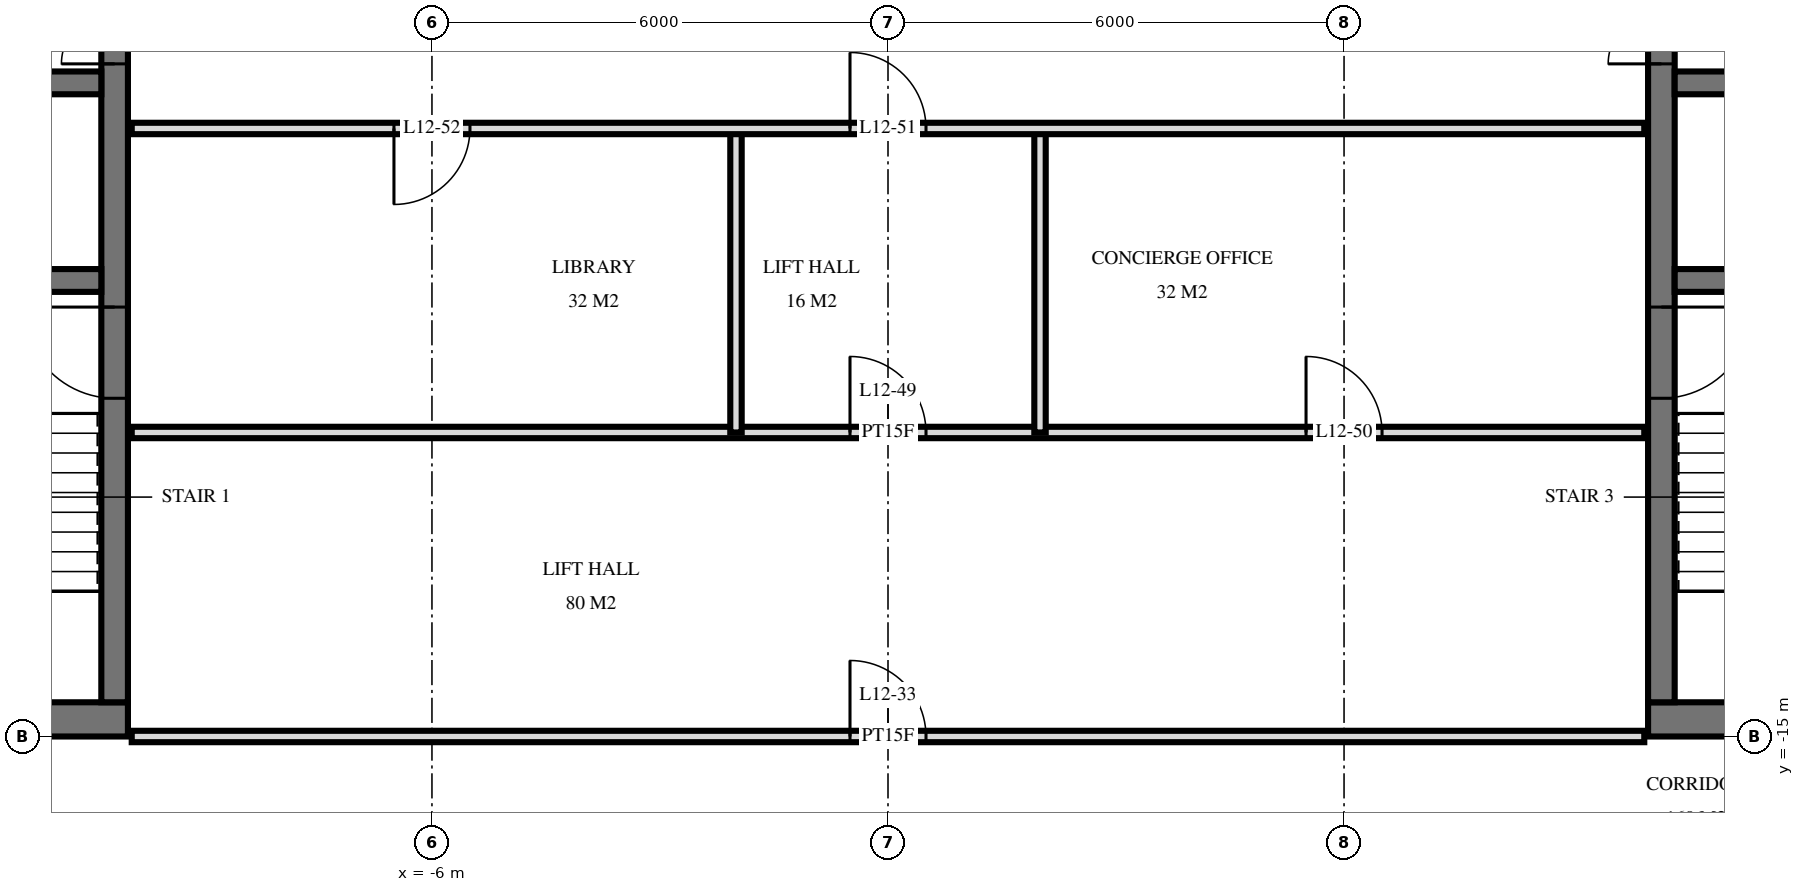
"""IFC4 building model, lengths in metres.
Left out: names, types, materials, properties, quantities, classifications, styles, units other than length and angle.
Written with IfcOpenShell. Run it as: python <this file> out.ifc"""

import sys

from ifc_helpers import new_model, si_unit, direction, frame, frame_2d, origin, place, context, subcontext, project, spatial, rectangle, extrude, element, fill, save


model = new_model("IFC4")
c1 = context("Model", 3, precision=1e-05, world=origin(), true_north=direction((0.0, 1.0)))
c2 = subcontext(c1, "Body", "Model", "MODEL_VIEW")
j1 = project(units=[si_unit("LENGTHUNIT", "METRE"), si_unit("PLANEANGLEUNIT", "RADIAN")], contexts=[c1])
p1 = place(None, origin())
s1 = spatial("IfcSite", under=j1, at=p1, CompositionType="ELEMENT")
p2 = place(p1, origin())
s2 = spatial("IfcBuilding", under=s1, at=p2, CompositionType="ELEMENT")
p3 = place(p2, frame((0.0, 0.0, 52.8)))
s3 = spatial("IfcBuildingStorey", under=s2, at=p3, CompositionType="ELEMENT", Elevation=52.8)
p4 = place(p3, frame((-29.5, -14.775, 0.0), z_axis=(0.0, 0.0, 1.0), x_axis=(1.0, 0.0, 0.0)))
e1 = element("IfcWall", 1, at=p4, inside=s3, PredefinedType="SHEAR", context=c2, shape_type="SweptSolid", body=[
    extrude(rectangle(XDim=19.5, YDim=0.45, at=frame_2d((9.75, 0.0))), origin(), (0.0, 0.0, 1.0), 3.6),
])
p5 = place(p4, frame((11.2, 0.0, 0.0)))
e2 = element("IfcOpeningElement", 2, at=p5, cuts=e1, PredefinedType="OPENING", context=c2, shape_type="SweptSolid", body=[
    extrude(rectangle(XDim=1.2, YDim=2.1, at=frame_2d((0.6, 1.05))), frame((0.0, 0.235, 0.0), z_axis=(0.0, -1.0, 0.0), x_axis=(1.0, 0.0, 0.0)), (0.0, 0.0, 1.0), 0.47),
])
p6 = place(p4, frame((14.25, 0.0, 0.0)))
e3 = element("IfcOpeningElement", 3, at=p6, cuts=e1, PredefinedType="OPENING", context=c2, shape_type="SweptSolid", body=[
    extrude(rectangle(XDim=1.1, YDim=2.1, at=frame_2d((0.55, 1.05))), frame((0.0, 0.235, 0.0), z_axis=(0.0, -1.0, 0.0), x_axis=(1.0, 0.0, 0.0)), (0.0, 0.0, 1.0), 0.47),
])
p7 = place(p4, frame((8.5, 0.0, 0.0)))
e4 = element("IfcOpeningElement", 4, at=p7, cuts=e1, PredefinedType="OPENING", context=c2, shape_type="SweptSolid", body=[
    extrude(rectangle(XDim=0.9, YDim=2.1, at=frame_2d((0.45, 1.05))), frame((0.0, 0.235, 0.0), z_axis=(0.0, -1.0, 0.0), x_axis=(1.0, 0.0, 0.0)), (0.0, 0.0, 1.0), 0.47),
])
p8 = place(p4, frame((6.05, 0.0, 0.0)))
e5 = element("IfcOpeningElement", 5, at=p8, cuts=e1, PredefinedType="OPENING", context=c2, shape_type="SweptSolid", body=[
    extrude(rectangle(XDim=1.0, YDim=2.1, at=frame_2d((0.5, 1.05))), frame((0.0, 0.235, 0.0), z_axis=(0.0, -1.0, 0.0), x_axis=(1.0, 0.0, 0.0)), (0.0, 0.0, 1.0), 0.47),
])
p9 = place(p4, frame((3.413, 0.0, 0.0)))
e6 = element("IfcOpeningElement", 6, at=p9, cuts=e1, PredefinedType="OPENING", context=c2, shape_type="SweptSolid", body=[
    extrude(rectangle(XDim=1.0, YDim=2.1, at=frame_2d((0.5, 1.05))), frame((0.0, 0.235, 0.0), z_axis=(0.0, -1.0, 0.0), x_axis=(1.0, 0.0, 0.0)), (0.0, 0.0, 1.0), 0.47),
])
p10 = place(p4, frame((1.087, 0.0, 0.0)))
e7 = element("IfcOpeningElement", 7, at=p10, cuts=e1, PredefinedType="OPENING", context=c2, shape_type="SweptSolid", body=[
    extrude(rectangle(XDim=1.0, YDim=2.1, at=frame_2d((0.5, 1.05))), frame((0.0, 0.235, 0.0), z_axis=(0.0, -1.0, 0.0), x_axis=(1.0, 0.0, 0.0)), (0.0, 0.0, 1.0), 0.47),
])
p11 = place(p3, frame((-10.175, -14.55, 0.0), z_axis=(0.0, 0.0, 1.0), x_axis=(0.0, 1.0, 0.0)))
e8 = element("IfcWall", 8, at=p11, inside=s3, PredefinedType="SHEAR", context=c2, shape_type="SweptSolid", body=[
    extrude(rectangle(XDim=14.1, YDim=0.35, at=frame_2d((7.05, 0.0))), origin(), (0.0, 0.0, 1.0), 3.6),
])
p12 = place(p11, frame((8.4, 0.0, 0.0)))
e9 = element("IfcOpeningElement", 9, at=p12, cuts=e8, PredefinedType="OPENING", context=c2, shape_type="SweptSolid", body=[
    extrude(rectangle(XDim=1.4, YDim=2.4, at=frame_2d((0.7, 1.2))), frame((0.0, 0.185, 0.0), z_axis=(0.0, -1.0, 0.0), x_axis=(1.0, 0.0, 0.0)), (0.0, 0.0, 1.0), 0.37),
])
p13 = place(p11, frame((10.0, 0.0, 0.0)))
e10 = element("IfcOpeningElement", 10, at=p13, cuts=e8, PredefinedType="OPENING", context=c2, shape_type="SweptSolid", body=[
    extrude(rectangle(XDim=1.4, YDim=2.4, at=frame_2d((0.7, 1.2))), frame((0.0, 0.185, 0.0), z_axis=(0.0, -1.0, 0.0), x_axis=(1.0, 0.0, 0.0)), (0.0, 0.0, 1.0), 0.37),
])
p14 = place(p11, frame((4.0, 0.0, 0.0)))
e11 = element("IfcOpeningElement", 11, at=p14, cuts=e8, PredefinedType="OPENING", context=c2, shape_type="SweptSolid", body=[
    extrude(rectangle(XDim=1.2, YDim=2.1, at=frame_2d((0.6, 1.05))), frame((0.0, 0.185, 0.0), z_axis=(0.0, -1.0, 0.0), x_axis=(1.0, 0.0, 0.0)), (0.0, 0.0, 1.0), 0.37),
])
p15 = place(p3, frame((-29.05, -6.4, 0.0), z_axis=(0.0, 0.0, 1.0), x_axis=(1.0, 0.0, 0.0)))
e12 = element("IfcWall", 12, at=p15, inside=s3, PredefinedType="SHEAR", context=c2, shape_type="SweptSolid", body=[
    extrude(rectangle(XDim=18.7, YDim=0.3, at=frame_2d((9.35, 0.0))), origin(), (0.0, 0.0, 1.0), 3.6),
])
p16 = place(p15, frame((2.95, 0.0, 0.0)))
e13 = element("IfcOpeningElement", 13, at=p16, cuts=e12, PredefinedType="OPENING", context=c2, shape_type="SweptSolid", body=[
    extrude(rectangle(XDim=1.1, YDim=2.1, at=frame_2d((0.55, 1.05))), frame((0.0, 0.16, 0.0), z_axis=(0.0, -1.0, 0.0), x_axis=(1.0, 0.0, 0.0)), (0.0, 0.0, 1.0), 0.32),
])
p17 = place(p15, frame((0.55, 0.0, 0.0)))
e14 = element("IfcOpeningElement", 14, at=p17, cuts=e12, PredefinedType="OPENING", context=c2, shape_type="SweptSolid", body=[
    extrude(rectangle(XDim=1.1, YDim=2.1, at=frame_2d((0.55, 1.05))), frame((0.0, 0.16, 0.0), z_axis=(0.0, -1.0, 0.0), x_axis=(1.0, 0.0, 0.0)), (0.0, 0.0, 1.0), 0.32),
])
p18 = place(p15, frame((10.8, 0.0, 0.0)))
e15 = element("IfcOpeningElement", 15, at=p18, cuts=e12, PredefinedType="OPENING", context=c2, shape_type="SweptSolid", body=[
    extrude(rectangle(XDim=1.1, YDim=2.1, at=frame_2d((0.55, 1.05))), frame((0.0, 0.16, 0.0), z_axis=(0.0, -1.0, 0.0), x_axis=(1.0, 0.0, 0.0)), (0.0, 0.0, 1.0), 0.32),
])
p19 = place(p15, frame((5.6, 0.0, 0.0)))
e16 = element("IfcOpeningElement", 16, at=p19, cuts=e12, PredefinedType="OPENING", context=c2, shape_type="SweptSolid", body=[
    extrude(rectangle(XDim=1.0, YDim=2.1, at=frame_2d((0.5, 1.05))), frame((0.0, 0.16, 0.0), z_axis=(0.0, -1.0, 0.0), x_axis=(1.0, 0.0, 0.0)), (0.0, 0.0, 1.0), 0.32),
])
p20 = place(p3, frame((-29.05, -9.0, 0.0), z_axis=(0.0, 0.0, 1.0), x_axis=(1.0, 0.0, 0.0)))
e17 = element("IfcWall", 17, at=p20, inside=s3, PredefinedType="SHEAR", context=c2, shape_type="SweptSolid", body=[
    extrude(rectangle(XDim=18.7, YDim=0.3, at=frame_2d((9.35, 0.0))), origin(), (0.0, 0.0, 1.0), 3.6),
])
p21 = place(p20, frame((13.8, 0.0, 0.0)))
e18 = element("IfcOpeningElement", 18, at=p21, cuts=e17, PredefinedType="OPENING", context=c2, shape_type="SweptSolid", body=[
    extrude(rectangle(XDim=1.1, YDim=2.1, at=frame_2d((0.55, 1.05))), frame((0.0, 0.16, 0.0), z_axis=(0.0, -1.0, 0.0), x_axis=(1.0, 0.0, 0.0)), (0.0, 0.0, 1.0), 0.32),
])
p22 = place(p3, frame((10.0, -14.775, 0.0), z_axis=(0.0, 0.0, 1.0), x_axis=(1.0, 0.0, 0.0)))
e19 = element("IfcWall", 19, at=p22, inside=s3, PredefinedType="SHEAR", context=c2, shape_type="SweptSolid", body=[
    extrude(rectangle(XDim=19.5, YDim=0.45, at=frame_2d((9.75, 0.0))), origin(), (0.0, 0.0, 1.0), 3.6),
])
p23 = place(p22, frame((7.1, 0.0, 0.0)))
e20 = element("IfcOpeningElement", 20, at=p23, cuts=e19, PredefinedType="OPENING", context=c2, shape_type="SweptSolid", body=[
    extrude(rectangle(XDim=1.2, YDim=2.1, at=frame_2d((0.6, 1.05))), frame((0.0, 0.235, 0.0), z_axis=(0.0, -1.0, 0.0), x_axis=(1.0, 0.0, 0.0)), (0.0, 0.0, 1.0), 0.47),
])
p24 = place(p22, frame((4.15, 0.0, 0.0)))
e21 = element("IfcOpeningElement", 21, at=p24, cuts=e19, PredefinedType="OPENING", context=c2, shape_type="SweptSolid", body=[
    extrude(rectangle(XDim=1.1, YDim=2.1, at=frame_2d((0.55, 1.05))), frame((0.0, 0.235, 0.0), z_axis=(0.0, -1.0, 0.0), x_axis=(1.0, 0.0, 0.0)), (0.0, 0.0, 1.0), 0.47),
])
p25 = place(p22, frame((10.1, 0.0, 0.0)))
e22 = element("IfcOpeningElement", 22, at=p25, cuts=e19, PredefinedType="OPENING", context=c2, shape_type="SweptSolid", body=[
    extrude(rectangle(XDim=0.9, YDim=2.1, at=frame_2d((0.45, 1.05))), frame((0.0, 0.235, 0.0), z_axis=(0.0, -1.0, 0.0), x_axis=(1.0, 0.0, 0.0)), (0.0, 0.0, 1.0), 0.47),
])
p26 = place(p22, frame((12.45, 0.0, 0.0)))
e23 = element("IfcOpeningElement", 23, at=p26, cuts=e19, PredefinedType="OPENING", context=c2, shape_type="SweptSolid", body=[
    extrude(rectangle(XDim=1.0, YDim=2.1, at=frame_2d((0.5, 1.05))), frame((0.0, 0.235, 0.0), z_axis=(0.0, -1.0, 0.0), x_axis=(1.0, 0.0, 0.0)), (0.0, 0.0, 1.0), 0.47),
])
p27 = place(p22, frame((15.087, 0.0, 0.0)))
e24 = element("IfcOpeningElement", 24, at=p27, cuts=e19, PredefinedType="OPENING", context=c2, shape_type="SweptSolid", body=[
    extrude(rectangle(XDim=1.0, YDim=2.1, at=frame_2d((0.5, 1.05))), frame((0.0, 0.235, 0.0), z_axis=(0.0, -1.0, 0.0), x_axis=(1.0, 0.0, 0.0)), (0.0, 0.0, 1.0), 0.47),
])
p28 = place(p22, frame((17.413, 0.0, 0.0)))
e25 = element("IfcOpeningElement", 25, at=p28, cuts=e19, PredefinedType="OPENING", context=c2, shape_type="SweptSolid", body=[
    extrude(rectangle(XDim=1.0, YDim=2.1, at=frame_2d((0.5, 1.05))), frame((0.0, 0.235, 0.0), z_axis=(0.0, -1.0, 0.0), x_axis=(1.0, 0.0, 0.0)), (0.0, 0.0, 1.0), 0.47),
])
p29 = place(p3, frame((10.175, -14.55, 0.0), z_axis=(0.0, 0.0, 1.0), x_axis=(0.0, 1.0, 0.0)))
e26 = element("IfcWall", 26, at=p29, inside=s3, PredefinedType="SHEAR", context=c2, shape_type="SweptSolid", body=[
    extrude(rectangle(XDim=14.1, YDim=0.35, at=frame_2d((7.05, 0.0))), origin(), (0.0, 0.0, 1.0), 3.6),
])
p30 = place(p29, frame((8.4, 0.0, 0.0)))
e27 = element("IfcOpeningElement", 27, at=p30, cuts=e26, PredefinedType="OPENING", context=c2, shape_type="SweptSolid", body=[
    extrude(rectangle(XDim=1.4, YDim=2.4, at=frame_2d((0.7, 1.2))), frame((0.0, 0.185, 0.0), z_axis=(0.0, -1.0, 0.0), x_axis=(1.0, 0.0, 0.0)), (0.0, 0.0, 1.0), 0.37),
])
p31 = place(p29, frame((10.0, 0.0, 0.0)))
e28 = element("IfcOpeningElement", 28, at=p31, cuts=e26, PredefinedType="OPENING", context=c2, shape_type="SweptSolid", body=[
    extrude(rectangle(XDim=1.4, YDim=2.4, at=frame_2d((0.7, 1.2))), frame((0.0, 0.185, 0.0), z_axis=(0.0, -1.0, 0.0), x_axis=(1.0, 0.0, 0.0)), (0.0, 0.0, 1.0), 0.37),
])
p32 = place(p29, frame((4.0, 0.0, 0.0)))
e29 = element("IfcOpeningElement", 29, at=p32, cuts=e26, PredefinedType="OPENING", context=c2, shape_type="SweptSolid", body=[
    extrude(rectangle(XDim=1.2, YDim=2.1, at=frame_2d((0.6, 1.05))), frame((0.0, 0.185, 0.0), z_axis=(0.0, -1.0, 0.0), x_axis=(1.0, 0.0, 0.0)), (0.0, 0.0, 1.0), 0.37),
])
p33 = place(p3, frame((10.35, -6.4, 0.0), z_axis=(0.0, 0.0, 1.0), x_axis=(1.0, 0.0, 0.0)))
e30 = element("IfcWall", 30, at=p33, inside=s3, PredefinedType="SHEAR", context=c2, shape_type="SweptSolid", body=[
    extrude(rectangle(XDim=18.7, YDim=0.3, at=frame_2d((9.35, 0.0))), origin(), (0.0, 0.0, 1.0), 3.6),
])
p34 = place(p33, frame((14.65, 0.0, 0.0)))
e31 = element("IfcOpeningElement", 31, at=p34, cuts=e30, PredefinedType="OPENING", context=c2, shape_type="SweptSolid", body=[
    extrude(rectangle(XDim=1.1, YDim=2.1, at=frame_2d((0.55, 1.05))), frame((0.0, 0.16, 0.0), z_axis=(0.0, -1.0, 0.0), x_axis=(1.0, 0.0, 0.0)), (0.0, 0.0, 1.0), 0.32),
])
p35 = place(p33, frame((17.05, 0.0, 0.0)))
e32 = element("IfcOpeningElement", 32, at=p35, cuts=e30, PredefinedType="OPENING", context=c2, shape_type="SweptSolid", body=[
    extrude(rectangle(XDim=1.1, YDim=2.1, at=frame_2d((0.55, 1.05))), frame((0.0, 0.16, 0.0), z_axis=(0.0, -1.0, 0.0), x_axis=(1.0, 0.0, 0.0)), (0.0, 0.0, 1.0), 0.32),
])
p36 = place(p33, frame((6.8, 0.0, 0.0)))
e33 = element("IfcOpeningElement", 33, at=p36, cuts=e30, PredefinedType="OPENING", context=c2, shape_type="SweptSolid", body=[
    extrude(rectangle(XDim=1.1, YDim=2.1, at=frame_2d((0.55, 1.05))), frame((0.0, 0.16, 0.0), z_axis=(0.0, -1.0, 0.0), x_axis=(1.0, 0.0, 0.0)), (0.0, 0.0, 1.0), 0.32),
])
p37 = place(p33, frame((12.1, 0.0, 0.0)))
e34 = element("IfcOpeningElement", 34, at=p37, cuts=e30, PredefinedType="OPENING", context=c2, shape_type="SweptSolid", body=[
    extrude(rectangle(XDim=1.0, YDim=2.1, at=frame_2d((0.5, 1.05))), frame((0.0, 0.16, 0.0), z_axis=(0.0, -1.0, 0.0), x_axis=(1.0, 0.0, 0.0)), (0.0, 0.0, 1.0), 0.32),
])
p38 = place(p3, frame((10.35, -9.0, 0.0), z_axis=(0.0, 0.0, 1.0), x_axis=(1.0, 0.0, 0.0)))
e35 = element("IfcWall", 35, at=p38, inside=s3, PredefinedType="SHEAR", context=c2, shape_type="SweptSolid", body=[
    extrude(rectangle(XDim=18.7, YDim=0.3, at=frame_2d((9.35, 0.0))), origin(), (0.0, 0.0, 1.0), 3.6),
])
p39 = place(p38, frame((3.8, 0.0, 0.0)))
e36 = element("IfcOpeningElement", 36, at=p39, cuts=e35, PredefinedType="OPENING", context=c2, shape_type="SweptSolid", body=[
    extrude(rectangle(XDim=1.1, YDim=2.1, at=frame_2d((0.55, 1.05))), frame((0.0, 0.16, 0.0), z_axis=(0.0, -1.0, 0.0), x_axis=(1.0, 0.0, 0.0)), (0.0, 0.0, 1.0), 0.32),
])
for number, where, z_axis, x_axis in (
    (37, (2.0, -11.0, 0.0), (0.0, 0.0, 1.0), (0.0, 1.0, 0.0)),
    (38, (-2.0, -11.0, 0.0), (0.0, 0.0, 1.0), (0.0, 1.0, 0.0)),
):
    element("IfcWall", number, at=place(p3, frame(where, z_axis=z_axis, x_axis=x_axis)), inside=s3, PredefinedType="PARTITIONING", context=c2, shape_type="SweptSolid", body=[
        extrude(rectangle(XDim=4.0, YDim=0.15, at=frame_2d((2.0, 0.0))), origin(), (0.0, 0.0, 1.0), 3.32),
    ])
p40 = place(p3, frame((-9.95, -15.0, 0.0), z_axis=(0.0, 0.0, 1.0), x_axis=(1.0, 0.0, 0.0)))
e39 = element("IfcWall", 39, at=p40, inside=s3, PredefinedType="PARTITIONING", context=c2, shape_type="SweptSolid", body=[
    extrude(rectangle(XDim=19.9, YDim=0.15, at=frame_2d((9.95, 0.0))), origin(), (0.0, 0.0, 1.0), 2.684),
])
p41 = place(p40, frame((9.45, 0.0, 0.0)))
e40 = element("IfcOpeningElement", 40, at=p41, cuts=e39, PredefinedType="OPENING", context=c2, shape_type="SweptSolid", body=[
    extrude(rectangle(XDim=1.0, YDim=2.1, at=frame_2d((0.5, 1.05))), frame((0.0, 0.085, 0.0), z_axis=(0.0, -1.0, 0.0), x_axis=(1.0, 0.0, 0.0)), (0.0, 0.0, 1.0), 0.17),
])
p42 = place(p3, frame((-9.95, -11.0, 0.0), z_axis=(0.0, 0.0, 1.0), x_axis=(1.0, 0.0, 0.0)))
e41 = element("IfcWall", 41, at=p42, inside=s3, PredefinedType="PARTITIONING", context=c2, shape_type="SweptSolid", body=[
    extrude(rectangle(XDim=19.9, YDim=0.15, at=frame_2d((9.95, 0.0))), origin(), (0.0, 0.0, 1.0), 3.32),
])
p43 = place(p42, frame((9.45, 0.0, 0.0)))
e42 = element("IfcOpeningElement", 42, at=p43, cuts=e41, PredefinedType="OPENING", context=c2, shape_type="SweptSolid", body=[
    extrude(rectangle(XDim=1.0, YDim=2.1, at=frame_2d((0.5, 1.05))), frame((0.0, 0.085, 0.0), z_axis=(0.0, -1.0, 0.0), x_axis=(1.0, 0.0, 0.0)), (0.0, 0.0, 1.0), 0.17),
])
p44 = place(p42, frame((15.45, 0.0, 0.0)))
e43 = element("IfcOpeningElement", 43, at=p44, cuts=e41, PredefinedType="OPENING", context=c2, shape_type="SweptSolid", body=[
    extrude(rectangle(XDim=1.0, YDim=2.1, at=frame_2d((0.5, 1.05))), frame((0.0, 0.085, 0.0), z_axis=(0.0, -1.0, 0.0), x_axis=(1.0, 0.0, 0.0)), (0.0, 0.0, 1.0), 0.17),
])
p45 = place(p3, frame((-9.95, -7.0, 0.0), z_axis=(0.0, 0.0, 1.0), x_axis=(1.0, 0.0, 0.0)))
e44 = element("IfcWall", 44, at=p45, inside=s3, PredefinedType="PARTITIONING", context=c2, shape_type="SweptSolid", body=[
    extrude(rectangle(XDim=19.9, YDim=0.15, at=frame_2d((9.95, 0.0))), origin(), (0.0, 0.0, 1.0), 3.32),
])
p46 = place(p45, frame((9.45, 0.0, 0.0)))
e45 = element("IfcOpeningElement", 45, at=p46, cuts=e44, PredefinedType="OPENING", context=c2, shape_type="SweptSolid", body=[
    extrude(rectangle(XDim=1.0, YDim=2.1, at=frame_2d((0.5, 1.05))), frame((0.0, 0.085, 0.0), z_axis=(0.0, -1.0, 0.0), x_axis=(1.0, 0.0, 0.0)), (0.0, 0.0, 1.0), 0.17),
])
p47 = place(p45, frame((3.45, 0.0, 0.0)))
e46 = element("IfcOpeningElement", 46, at=p47, cuts=e44, PredefinedType="OPENING", context=c2, shape_type="SweptSolid", body=[
    extrude(rectangle(XDim=1.0, YDim=2.1, at=frame_2d((0.5, 1.05))), frame((0.0, 0.085, 0.0), z_axis=(0.0, -1.0, 0.0), x_axis=(1.0, 0.0, 0.0)), (0.0, 0.0, 1.0), 0.17),
])
p48 = place(p12, origin())
e47 = element("IfcDoor", 47, at=p48, inside=s3, OperationType="DOUBLE_DOOR_SINGLE_SWING", PredefinedType="DOOR", context=c2, shape_type="SweptSolid", body=[
    extrude(rectangle(XDim=1.4, YDim=2.4, at=frame_2d((0.7, 1.2))), frame((0.0, 0.025, 0.0), z_axis=(0.0, -1.0, 0.0), x_axis=(1.0, 0.0, 0.0)), (0.0, 0.0, 1.0), 0.05),
])
fill(e9, e47)
p49 = place(p14, origin())
e48 = element("IfcDoor", 48, at=p49, inside=s3, OperationType="SINGLE_SWING_LEFT", PredefinedType="DOOR", context=c2, shape_type="SweptSolid", body=[
    extrude(rectangle(XDim=1.2, YDim=2.1, at=frame_2d((0.6, 1.05))), frame((0.0, 0.025, 0.0), z_axis=(0.0, -1.0, 0.0), x_axis=(1.0, 0.0, 0.0)), (0.0, 0.0, 1.0), 0.05),
])
fill(e11, e48)
p50 = place(p30, origin())
e49 = element("IfcDoor", 49, at=p50, inside=s3, OperationType="DOUBLE_DOOR_SINGLE_SWING", PredefinedType="DOOR", context=c2, shape_type="SweptSolid", body=[
    extrude(rectangle(XDim=1.4, YDim=2.4, at=frame_2d((0.7, 1.2))), frame((0.0, 0.025, 0.0), z_axis=(0.0, -1.0, 0.0), x_axis=(1.0, 0.0, 0.0)), (0.0, 0.0, 1.0), 0.05),
])
fill(e27, e49)
p51 = place(p32, frame((0.6, 0.0, 0.0), z_axis=(0.0, 0.0, 1.0), x_axis=(-1.0, 0.0, 0.0)))
e50 = element("IfcDoor", 50, at=p51, inside=s3, OperationType="SINGLE_SWING_RIGHT", PredefinedType="DOOR", context=c2, shape_type="SweptSolid", body=[
    extrude(rectangle(XDim=1.2, YDim=2.1, at=frame_2d((0.0, 1.05))), frame((0.0, -0.025, 0.0), z_axis=(0.0, 1.0, 0.0), x_axis=(-1.0, 0.0, 0.0)), (0.0, 0.0, 1.0), 0.05),
])
fill(e29, e50)
p52 = place(p41, origin())
e51 = element("IfcDoor", 51, at=p52, inside=s3, OperationType="SINGLE_SWING_RIGHT", PredefinedType="DOOR", context=c2, shape_type="SweptSolid", body=[
    extrude(rectangle(XDim=1.0, YDim=2.1, at=frame_2d((0.5, 1.05))), frame((0.0, 0.025, 0.0), z_axis=(0.0, -1.0, 0.0), x_axis=(1.0, 0.0, 0.0)), (0.0, 0.0, 1.0), 0.05),
])
fill(e40, e51)
p53 = place(p43, origin())
e52 = element("IfcDoor", 52, at=p53, inside=s3, OperationType="SINGLE_SWING_RIGHT", PredefinedType="DOOR", context=c2, shape_type="SweptSolid", body=[
    extrude(rectangle(XDim=1.0, YDim=2.1, at=frame_2d((0.5, 1.05))), frame((0.0, 0.025, 0.0), z_axis=(0.0, -1.0, 0.0), x_axis=(1.0, 0.0, 0.0)), (0.0, 0.0, 1.0), 0.05),
])
fill(e42, e52)
p54 = place(p44, origin())
e53 = element("IfcDoor", 53, at=p54, inside=s3, OperationType="SINGLE_SWING_RIGHT", PredefinedType="DOOR", context=c2, shape_type="SweptSolid", body=[
    extrude(rectangle(XDim=1.0, YDim=2.1, at=frame_2d((0.5, 1.05))), frame((0.0, 0.025, 0.0), z_axis=(0.0, -1.0, 0.0), x_axis=(1.0, 0.0, 0.0)), (0.0, 0.0, 1.0), 0.05),
])
fill(e43, e53)
p55 = place(p46, origin())
e54 = element("IfcDoor", 54, at=p55, inside=s3, OperationType="SINGLE_SWING_RIGHT", PredefinedType="DOOR", context=c2, shape_type="SweptSolid", body=[
    extrude(rectangle(XDim=1.0, YDim=2.1, at=frame_2d((0.5, 1.05))), frame((0.0, 0.025, 0.0), z_axis=(0.0, -1.0, 0.0), x_axis=(1.0, 0.0, 0.0)), (0.0, 0.0, 1.0), 0.05),
])
fill(e45, e54)
p56 = place(p47, frame((0.5, 0.0, 0.0), z_axis=(0.0, 0.0, 1.0), x_axis=(-1.0, 0.0, 0.0)))
e55 = element("IfcDoor", 55, at=p56, inside=s3, OperationType="SINGLE_SWING_LEFT", PredefinedType="DOOR", context=c2, shape_type="SweptSolid", body=[
    extrude(rectangle(XDim=1.0, YDim=2.1, at=frame_2d((0.0, 1.05))), frame((0.0, -0.025, 0.0), z_axis=(0.0, 1.0, 0.0), x_axis=(-1.0, 0.0, 0.0)), (0.0, 0.0, 1.0), 0.05),
])
fill(e46, e55)
save(model, sys.argv[1])
